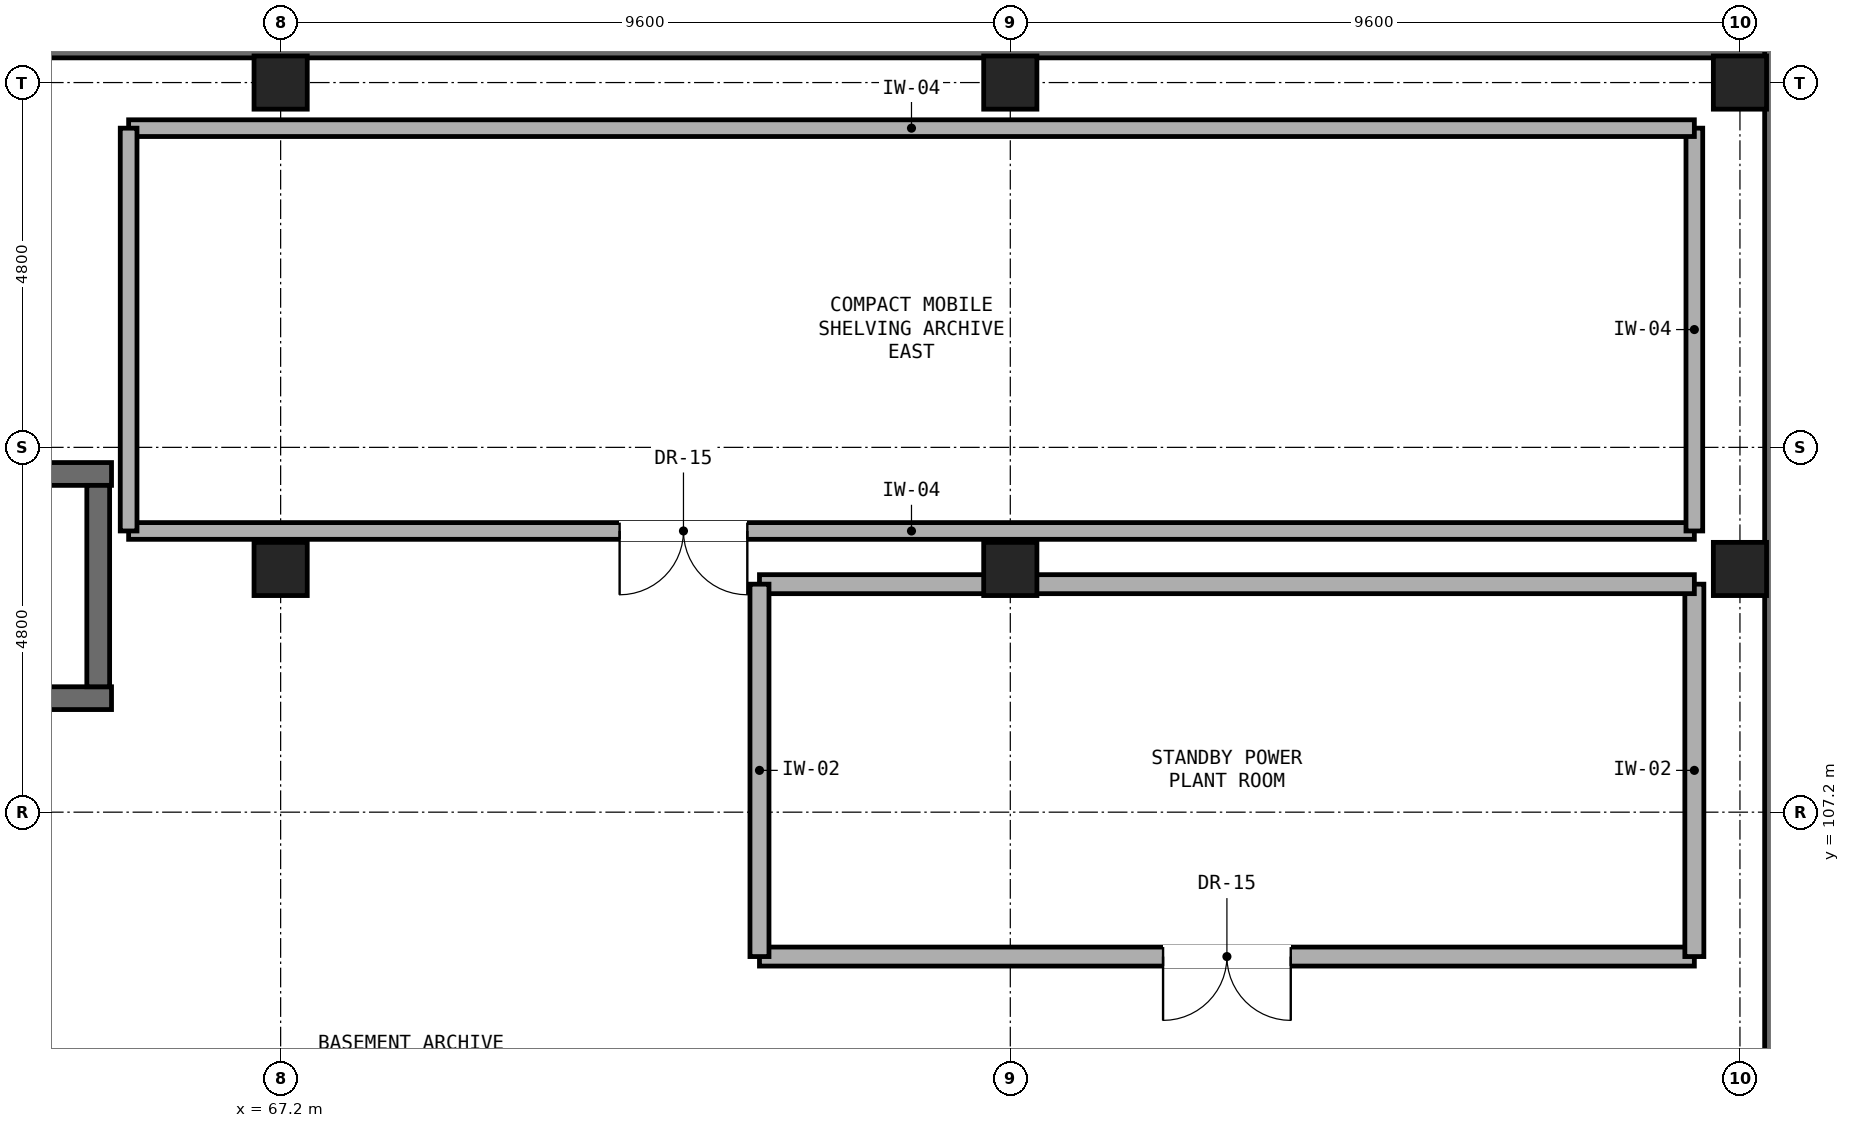
"""IFC4 building model, lengths in metres.
Left out: names, types, materials, properties, quantities, classifications, styles, units other than length and angle.
Written with IfcOpenShell. Run it as: python <this file> out.ifc"""

import sys

from ifc_helpers import new_model, si_unit, direction, frame, frame_2d, origin, origin_2d, place, context, subcontext, project, spatial, rectangle, extrude, element, fill, save


model = new_model("IFC4")
c1 = context("Model", 3, precision=1e-05, world=origin(), true_north=direction((0.0, 1.0)))
c2 = subcontext(c1, "Body", "Model", "MODEL_VIEW")
j1 = project(units=[si_unit("LENGTHUNIT", "METRE"), si_unit("PLANEANGLEUNIT", "RADIAN")], contexts=[c1])
p1 = place(None, origin())
s1 = spatial("IfcSite", under=j1, at=p1, CompositionType="ELEMENT")
p2 = place(p1, origin())
s2 = spatial("IfcBuilding", under=s1, at=p2, CompositionType="ELEMENT")
p3 = place(p2, frame((0.0, 0.0, -9.8)))
s3 = spatial("IfcBuildingStorey", under=s2, at=p3, CompositionType="ELEMENT", Elevation=-9.8)
for number, where, z_axis, x_axis in (
    (1, (67.2, 110.4, 0.0), (0.0, 0.0, 1.0), (1.0, 0.0, 0.0)),
    (2, (67.2, 116.8, 0.0), (0.0, 0.0, 1.0), (1.0, 0.0, 0.0)),
    (3, (76.8, 110.4, 0.0), (0.0, 0.0, 1.0), (1.0, 0.0, 0.0)),
    (4, (76.8, 116.8, 0.0), (0.0, 0.0, 1.0), (1.0, 0.0, 0.0)),
    (5, (86.4, 110.4, 0.0), (0.0, 0.0, 1.0), (1.0, 0.0, 0.0)),
    (6, (86.4, 116.8, 0.0), (0.0, 0.0, 1.0), (1.0, 0.0, 0.0)),
):
    element("IfcColumn", number, at=place(p3, frame(where, z_axis=z_axis, x_axis=x_axis)), inside=s3, PredefinedType="COLUMN", context=c2, shape_type="SweptSolid", body=[
        extrude(rectangle(XDim=0.7, YDim=0.7, at=origin_2d()), origin(), (0.0, 0.0, 1.0), 5.25),
    ])
p4 = place(p3, frame((-0.55, 117.35, 0.0), z_axis=(0.0, 0.0, 1.0), x_axis=(1.0, 0.0, 0.0)))
e7 = element("IfcWall", 7, at=p4, inside=s3, PredefinedType="USERDEFINED", context=c2, shape_type="SweptSolid", body=[
    extrude(rectangle(XDim=87.5, YDim=0.45, at=frame_2d((43.75, 0.0))), origin(), (0.0, 0.0, 1.0), 5.25),
])
p5 = place(p3, frame((86.95, 98.15, 0.0), z_axis=(0.0, 0.0, 1.0), x_axis=(0.0, 1.0, 0.0)))
e8 = element("IfcWall", 8, at=p5, inside=s3, PredefinedType="USERDEFINED", context=c2, shape_type="SweptSolid", body=[
    extrude(rectangle(XDim=19.2, YDim=0.45, at=frame_2d((9.6, 0.0))), origin(), (0.0, 0.0, 1.0), 5.25),
])
for number, where, z_axis, x_axis in (
    (9, (62.475, 108.7, 0.0), (0.0, 0.0, 1.0), (1.0, 0.0, 0.0)),
    (10, (62.475, 111.65, 0.0), (0.0, 0.0, 1.0), (1.0, 0.0, 0.0)),
):
    element("IfcWall", number, at=place(p3, frame(where, z_axis=z_axis, x_axis=x_axis)), inside=s3, PredefinedType="SHEAR", context=c2, shape_type="SweptSolid", body=[
        extrude(rectangle(XDim=2.5, YDim=0.3, at=frame_2d((1.25, 0.0))), origin(), (0.0, 0.0, 1.0), 4.97),
    ])
p6 = place(p3, frame((64.8, 108.85, 0.0), z_axis=(0.0, 0.0, 1.0), x_axis=(0.0, 1.0, 0.0)))
e11 = element("IfcWall", 11, at=p6, inside=s3, PredefinedType="SHEAR", context=c2, shape_type="SweptSolid", body=[
    extrude(rectangle(XDim=2.65, YDim=0.3, at=frame_2d((1.325, 0.0))), origin(), (0.0, 0.0, 1.0), 4.97),
])
p7 = place(p3, frame((65.2, 110.9, 0.0), z_axis=(0.0, 0.0, 1.0), x_axis=(1.0, 0.0, 0.0)))
e12 = element("IfcWall", 12, at=p7, inside=s3, PredefinedType="PARTITIONING", context=c2, shape_type="SweptSolid", body=[
    extrude(rectangle(XDim=20.6, YDim=0.22, at=frame_2d((10.3, 0.0))), origin(), (0.0, 0.0, 1.0), 4.97),
])
p8 = place(p7, frame((6.46, 0.0, 0.0)))
e13 = element("IfcOpeningElement", 13, at=p8, cuts=e12, PredefinedType="OPENING", context=c2, shape_type="SweptSolid", body=[
    extrude(rectangle(XDim=1.68, YDim=2.2, at=frame_2d((0.84, 1.1))), frame((0.0, 0.12, 0.0), z_axis=(0.0, -1.0, 0.0), x_axis=(1.0, 0.0, 0.0)), (0.0, 0.0, 1.0), 0.24),
])
p9 = place(p3, frame((85.8, 110.9, 0.0), z_axis=(0.0, 0.0, 1.0), x_axis=(0.0, 1.0, 0.0)))
e14 = element("IfcWall", 14, at=p9, inside=s3, PredefinedType="PARTITIONING", context=c2, shape_type="SweptSolid", body=[
    extrude(rectangle(XDim=5.3, YDim=0.22, at=frame_2d((2.65, 0.0))), origin(), (0.0, 0.0, 1.0), 4.97),
])
p10 = place(p3, frame((85.8, 116.2, 0.0), z_axis=(0.0, 0.0, 1.0), x_axis=(-1.0, 0.0, 0.0)))
e15 = element("IfcWall", 15, at=p10, inside=s3, PredefinedType="PARTITIONING", context=c2, shape_type="SweptSolid", body=[
    extrude(rectangle(XDim=20.6, YDim=0.22, at=frame_2d((10.3, 0.0))), origin(), (0.0, 0.0, 1.0), 4.97),
])
p11 = place(p3, frame((65.2, 116.2, 0.0), z_axis=(0.0, 0.0, 1.0), x_axis=(0.0, -1.0, 0.0)))
e16 = element("IfcWall", 16, at=p11, inside=s3, PredefinedType="PARTITIONING", context=c2, shape_type="SweptSolid", body=[
    extrude(rectangle(XDim=5.3, YDim=0.22, at=frame_2d((2.65, 0.0))), origin(), (0.0, 0.0, 1.0), 4.97),
])
p12 = place(p3, frame((73.5, 105.3, 0.0), z_axis=(0.0, 0.0, 1.0), x_axis=(1.0, 0.0, 0.0)))
e17 = element("IfcWall", 17, at=p12, inside=s3, PredefinedType="SOLIDWALL", context=c2, shape_type="SweptSolid", body=[
    extrude(rectangle(XDim=12.3, YDim=0.25, at=frame_2d((6.15, 0.0))), origin(), (0.0, 0.0, 1.0), 4.59),
])
p13 = place(p12, frame((5.31, 0.0, 0.0)))
e18 = element("IfcOpeningElement", 18, at=p13, cuts=e17, PredefinedType="OPENING", context=c2, shape_type="SweptSolid", body=[
    extrude(rectangle(XDim=1.68, YDim=2.2, at=frame_2d((0.84, 1.1))), frame((0.0, 0.135, 0.0), z_axis=(0.0, -1.0, 0.0), x_axis=(1.0, 0.0, 0.0)), (0.0, 0.0, 1.0), 0.27),
])
p14 = place(p3, frame((85.8, 105.3, 0.0), z_axis=(0.0, 0.0, 1.0), x_axis=(0.0, 1.0, 0.0)))
e19 = element("IfcWall", 19, at=p14, inside=s3, PredefinedType="SOLIDWALL", context=c2, shape_type="SweptSolid", body=[
    extrude(rectangle(XDim=4.9, YDim=0.25, at=frame_2d((2.45, 0.0))), origin(), (0.0, 0.0, 1.0), 4.97),
])
p15 = place(p3, frame((85.8, 110.2, 0.0), z_axis=(0.0, 0.0, 1.0), x_axis=(-1.0, 0.0, 0.0)))
e20 = element("IfcWall", 20, at=p15, inside=s3, PredefinedType="SOLIDWALL", context=c2, shape_type="SweptSolid", body=[
    extrude(rectangle(XDim=12.3, YDim=0.25, at=frame_2d((6.15, 0.0))), origin(), (0.0, 0.0, 1.0), 4.41),
])
p16 = place(p3, frame((73.5, 110.2, 0.0), z_axis=(0.0, 0.0, 1.0), x_axis=(0.0, -1.0, 0.0)))
e21 = element("IfcWall", 21, at=p16, inside=s3, PredefinedType="SOLIDWALL", context=c2, shape_type="SweptSolid", body=[
    extrude(rectangle(XDim=4.9, YDim=0.25, at=frame_2d((2.45, 0.0))), origin(), (0.0, 0.0, 1.0), 4.97),
])
p17 = place(p8, frame((1.68, 0.0, 0.0), z_axis=(0.0, 0.0, 1.0), x_axis=(-1.0, 0.0, 0.0)))
e22 = element("IfcDoor", 22, at=p17, inside=s3, OperationType="DOUBLE_DOOR_SINGLE_SWING", PredefinedType="DOOR", context=c2, shape_type="SweptSolid", body=[
    extrude(rectangle(XDim=1.68, YDim=2.2, at=frame_2d((0.84, 1.1))), frame((0.0, 0.025, 0.0), z_axis=(0.0, -1.0, 0.0), x_axis=(1.0, 0.0, 0.0)), (0.0, 0.0, 1.0), 0.05),
])
fill(e13, e22)
p18 = place(p13, frame((1.68, 0.0, 0.0), z_axis=(0.0, 0.0, 1.0), x_axis=(-1.0, 0.0, 0.0)))
e23 = element("IfcDoor", 23, at=p18, inside=s3, OperationType="DOUBLE_DOOR_SINGLE_SWING", PredefinedType="DOOR", context=c2, shape_type="SweptSolid", body=[
    extrude(rectangle(XDim=1.68, YDim=2.2, at=frame_2d((0.84, 1.1))), frame((0.0, 0.025, 0.0), z_axis=(0.0, -1.0, 0.0), x_axis=(1.0, 0.0, 0.0)), (0.0, 0.0, 1.0), 0.05),
])
fill(e18, e23)
save(model, sys.argv[1])
